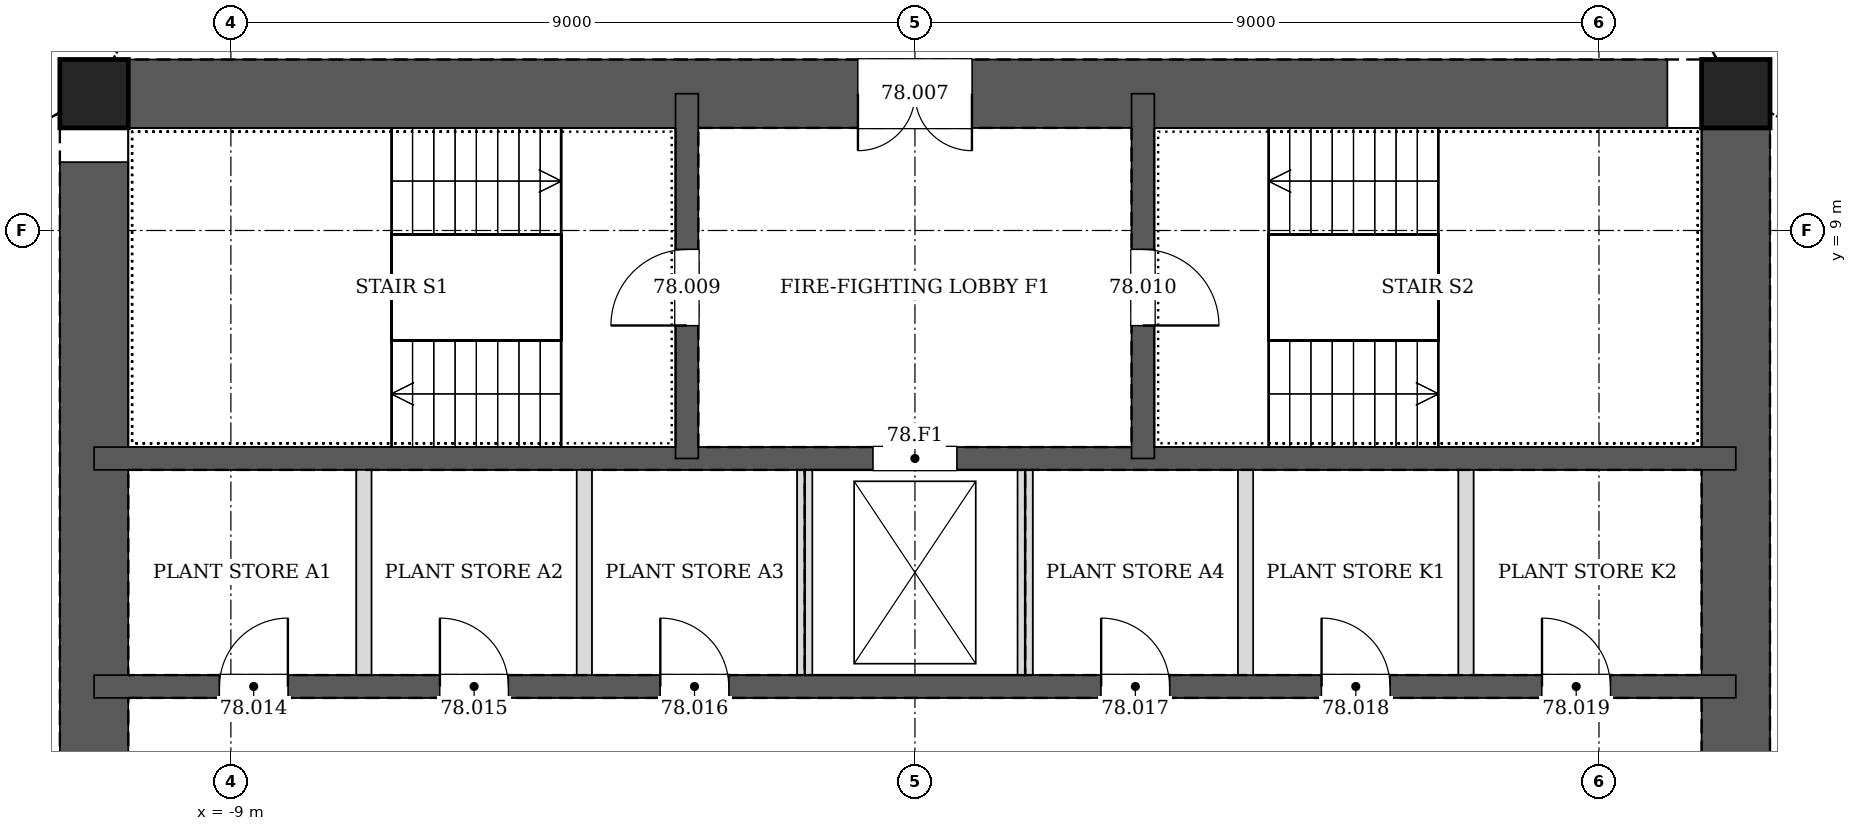
"""IFC4 building model, lengths in metres.
Left out: names, types, materials, properties, quantities, classifications, styles, units other than length and angle.
Written with IfcOpenShell. Run it as: python <this file> out.ifc"""

import sys

from ifc_helpers import new_model, si_unit, direction, frame, frame_2d, origin, origin_2d, place, context, subcontext, project, spatial, rectangle, hollow_rectangle, extrude, element, fill, save


model = new_model("IFC4")
c1 = context("Model", 3, precision=1e-05, world=origin(), true_north=direction((0.0, 1.0)))
c2 = subcontext(c1, "Body", "Model", "MODEL_VIEW")
j1 = project(units=[si_unit("LENGTHUNIT", "METRE"), si_unit("PLANEANGLEUNIT", "RADIAN")], contexts=[c1])
p1 = place(None, origin())
s1 = spatial("IfcSite", under=j1, at=p1, CompositionType="ELEMENT")
p2 = place(p1, origin())
s2 = spatial("IfcBuilding", under=s1, at=p2, CompositionType="ELEMENT")
p3 = place(p2, frame((0.0, 0.0, 317.6)))
s3 = spatial("IfcBuildingStorey", under=s2, at=p3, CompositionType="ELEMENT", Elevation=317.6)
for number, where, z_axis, x_axis in (
    (1, (10.8, 10.8, 0.0), (0.0, 0.0, 1.0), (1.0, 0.0, 0.0)),
    (2, (-10.8, 10.8, 0.0), (0.0, 0.0, 1.0), (1.0, 0.0, 0.0)),
):
    element("IfcColumn", number, at=place(p3, frame(where, z_axis=z_axis, x_axis=x_axis)), inside=s3, PredefinedType="COLUMN", context=c2, shape_type="SweptSolid", body=[
        extrude(hollow_rectangle(XDim=0.9, YDim=0.9, WallThickness=0.04, at=origin_2d()), origin(), (0.0, 0.0, 1.0), 6.0),
    ])
p4 = place(p3, frame((10.8, -10.8, 0.0), z_axis=(0.0, 0.0, 1.0), x_axis=(0.0, 1.0, 0.0)))
e3 = element("IfcWall", 3, at=p4, inside=s3, PredefinedType="SOLIDWALL", context=c2, shape_type="SweptSolid", body=[
    extrude(rectangle(XDim=21.6, YDim=0.9, at=frame_2d((10.8, 0.0))), origin(), (0.0, 0.0, 1.0), 6.0),
])
p5 = place(p4, frame((11.7, 0.0, 0.0)))
e4 = element("IfcOpeningElement", 4, at=p5, cuts=e3, PredefinedType="OPENING", context=c2, shape_type="SweptSolid", body=[
    extrude(rectangle(XDim=1.2, YDim=2.1, at=frame_2d((0.6, 1.05))), frame((0.0, 0.46, 0.0), z_axis=(0.0, -1.0, 0.0), x_axis=(1.0, 0.0, 0.0)), (0.0, 0.0, 1.0), 0.92),
])
p6 = place(p4, frame((8.7, 0.0, 0.0)))
e5 = element("IfcOpeningElement", 5, at=p6, cuts=e3, PredefinedType="OPENING", context=c2, shape_type="SweptSolid", body=[
    extrude(rectangle(XDim=1.2, YDim=2.1, at=frame_2d((0.6, 1.05))), frame((0.0, 0.46, 0.0), z_axis=(0.0, -1.0, 0.0), x_axis=(1.0, 0.0, 0.0)), (0.0, 0.0, 1.0), 0.92),
])
p7 = place(p3, frame((10.8, 10.8, 0.0), z_axis=(0.0, 0.0, 1.0), x_axis=(-1.0, 0.0, 0.0)))
e6 = element("IfcWall", 6, at=p7, inside=s3, PredefinedType="SOLIDWALL", context=c2, shape_type="SweptSolid", body=[
    extrude(rectangle(XDim=21.6, YDim=0.9, at=frame_2d((10.8, 0.0))), origin(), (0.0, 0.0, 1.0), 6.0),
])
p8 = place(p7, frame((10.05, 0.0, 0.0)))
e7 = element("IfcOpeningElement", 7, at=p8, cuts=e6, PredefinedType="OPENING", context=c2, shape_type="SweptSolid", body=[
    extrude(rectangle(XDim=1.5, YDim=2.1, at=frame_2d((0.75, 1.05))), frame((0.0, 0.46, 0.0), z_axis=(0.0, -1.0, 0.0), x_axis=(1.0, 0.0, 0.0)), (0.0, 0.0, 1.0), 0.92),
])
p9 = place(p3, frame((-10.8, 10.8, 0.0), z_axis=(0.0, 0.0, 1.0), x_axis=(0.0, -1.0, 0.0)))
e8 = element("IfcWall", 8, at=p9, inside=s3, PredefinedType="SOLIDWALL", context=c2, shape_type="SweptSolid", body=[
    extrude(rectangle(XDim=21.6, YDim=0.9, at=frame_2d((10.8, 0.0))), origin(), (0.0, 0.0, 1.0), 6.0),
])
p10 = place(p9, frame((8.7, 0.0, 0.0)))
e9 = element("IfcOpeningElement", 9, at=p10, cuts=e8, PredefinedType="OPENING", context=c2, shape_type="SweptSolid", body=[
    extrude(rectangle(XDim=1.2, YDim=2.1, at=frame_2d((0.6, 1.05))), frame((0.0, 0.46, 0.0), z_axis=(0.0, -1.0, 0.0), x_axis=(1.0, 0.0, 0.0)), (0.0, 0.0, 1.0), 0.92),
])
p11 = place(p9, frame((11.7, 0.0, 0.0)))
e10 = element("IfcOpeningElement", 10, at=p11, cuts=e8, PredefinedType="OPENING", context=c2, shape_type="SweptSolid", body=[
    extrude(rectangle(XDim=1.2, YDim=2.1, at=frame_2d((0.6, 1.05))), frame((0.0, 0.46, 0.0), z_axis=(0.0, -1.0, 0.0), x_axis=(1.0, 0.0, 0.0)), (0.0, 0.0, 1.0), 0.92),
])
p12 = place(p3, frame((-10.8, 3.0, 0.0), z_axis=(0.0, 0.0, 1.0), x_axis=(1.0, 0.0, 0.0)))
e11 = element("IfcWall", 11, at=p12, inside=s3, PredefinedType="SOLIDWALL", context=c2, shape_type="SweptSolid", body=[
    extrude(rectangle(XDim=21.6, YDim=0.3, at=frame_2d((10.8, 0.0))), origin(), (0.0, 0.0, 1.0), 6.0),
])
p13 = place(p12, frame((1.65, 0.0, 0.0)))
e12 = element("IfcOpeningElement", 12, at=p13, cuts=e11, PredefinedType="OPENING", context=c2, shape_type="SweptSolid", body=[
    extrude(rectangle(XDim=0.9, YDim=2.1, at=frame_2d((0.45, 1.05))), frame((0.0, 0.16, 0.0), z_axis=(0.0, -1.0, 0.0), x_axis=(1.0, 0.0, 0.0)), (0.0, 0.0, 1.0), 0.32),
])
p14 = place(p12, frame((4.55, 0.0, 0.0)))
e13 = element("IfcOpeningElement", 13, at=p14, cuts=e11, PredefinedType="OPENING", context=c2, shape_type="SweptSolid", body=[
    extrude(rectangle(XDim=0.9, YDim=2.1, at=frame_2d((0.45, 1.05))), frame((0.0, 0.16, 0.0), z_axis=(0.0, -1.0, 0.0), x_axis=(1.0, 0.0, 0.0)), (0.0, 0.0, 1.0), 0.32),
])
p15 = place(p12, frame((7.45, 0.0, 0.0)))
e14 = element("IfcOpeningElement", 14, at=p15, cuts=e11, PredefinedType="OPENING", context=c2, shape_type="SweptSolid", body=[
    extrude(rectangle(XDim=0.9, YDim=2.1, at=frame_2d((0.45, 1.05))), frame((0.0, 0.16, 0.0), z_axis=(0.0, -1.0, 0.0), x_axis=(1.0, 0.0, 0.0)), (0.0, 0.0, 1.0), 0.32),
])
p16 = place(p12, frame((13.25, 0.0, 0.0)))
e15 = element("IfcOpeningElement", 15, at=p16, cuts=e11, PredefinedType="OPENING", context=c2, shape_type="SweptSolid", body=[
    extrude(rectangle(XDim=0.9, YDim=2.1, at=frame_2d((0.45, 1.05))), frame((0.0, 0.16, 0.0), z_axis=(0.0, -1.0, 0.0), x_axis=(1.0, 0.0, 0.0)), (0.0, 0.0, 1.0), 0.32),
])
p17 = place(p12, frame((16.15, 0.0, 0.0)))
e16 = element("IfcOpeningElement", 16, at=p17, cuts=e11, PredefinedType="OPENING", context=c2, shape_type="SweptSolid", body=[
    extrude(rectangle(XDim=0.9, YDim=2.1, at=frame_2d((0.45, 1.05))), frame((0.0, 0.16, 0.0), z_axis=(0.0, -1.0, 0.0), x_axis=(1.0, 0.0, 0.0)), (0.0, 0.0, 1.0), 0.32),
])
p18 = place(p12, frame((19.05, 0.0, 0.0)))
e17 = element("IfcOpeningElement", 17, at=p18, cuts=e11, PredefinedType="OPENING", context=c2, shape_type="SweptSolid", body=[
    extrude(rectangle(XDim=0.9, YDim=2.1, at=frame_2d((0.45, 1.05))), frame((0.0, 0.16, 0.0), z_axis=(0.0, -1.0, 0.0), x_axis=(1.0, 0.0, 0.0)), (0.0, 0.0, 1.0), 0.32),
])
p19 = place(p3, frame((-10.8, 6.0, 0.0), z_axis=(0.0, 0.0, 1.0), x_axis=(1.0, 0.0, 0.0)))
e18 = element("IfcWall", 18, at=p19, inside=s3, PredefinedType="SOLIDWALL", context=c2, shape_type="SweptSolid", body=[
    extrude(rectangle(XDim=21.6, YDim=0.3, at=frame_2d((10.8, 0.0))), origin(), (0.0, 0.0, 1.0), 6.0),
])
p20 = place(p19, frame((10.25, 0.0, 0.0)))
e19 = element("IfcOpeningElement", 19, at=p20, cuts=e18, PredefinedType="OPENING", context=c2, shape_type="SweptSolid", body=[
    extrude(rectangle(XDim=1.1, YDim=2.1, at=frame_2d((0.55, 1.05))), frame((0.0, 0.16, 0.0), z_axis=(0.0, -1.0, 0.0), x_axis=(1.0, 0.0, 0.0)), (0.0, 0.0, 1.0), 0.32),
])
p21 = place(p3, frame((-3.0, 6.0, 0.0), z_axis=(0.0, 0.0, 1.0), x_axis=(0.0, 1.0, 0.0)))
e20 = element("IfcWall", 20, at=p21, inside=s3, PredefinedType="SOLIDWALL", context=c2, shape_type="SweptSolid", body=[
    extrude(rectangle(XDim=4.8, YDim=0.3, at=frame_2d((2.4, 0.0))), origin(), (0.0, 0.0, 1.0), 6.0),
])
p22 = place(p21, frame((1.75, 0.0, 0.0)))
e21 = element("IfcOpeningElement", 21, at=p22, cuts=e20, PredefinedType="OPENING", context=c2, shape_type="SweptSolid", body=[
    extrude(rectangle(XDim=1.0, YDim=2.1, at=frame_2d((0.5, 1.05))), frame((0.0, 0.16, 0.0), z_axis=(0.0, -1.0, 0.0), x_axis=(1.0, 0.0, 0.0)), (0.0, 0.0, 1.0), 0.32),
])
p23 = place(p3, frame((3.0, 6.0, 0.0), z_axis=(0.0, 0.0, 1.0), x_axis=(0.0, 1.0, 0.0)))
e22 = element("IfcWall", 22, at=p23, inside=s3, PredefinedType="SOLIDWALL", context=c2, shape_type="SweptSolid", body=[
    extrude(rectangle(XDim=4.8, YDim=0.3, at=frame_2d((2.4, 0.0))), origin(), (0.0, 0.0, 1.0), 6.0),
])
p24 = place(p23, frame((1.75, 0.0, 0.0)))
e23 = element("IfcOpeningElement", 23, at=p24, cuts=e22, PredefinedType="OPENING", context=c2, shape_type="SweptSolid", body=[
    extrude(rectangle(XDim=1.0, YDim=2.1, at=frame_2d((0.5, 1.05))), frame((0.0, 0.16, 0.0), z_axis=(0.0, -1.0, 0.0), x_axis=(1.0, 0.0, 0.0)), (0.0, 0.0, 1.0), 0.32),
])
for number, where, z_axis, x_axis in (
    (24, (-7.25, 3.15, 0.0), (0.0, 0.0, 1.0), (0.0, 1.0, 0.0)),
    (25, (-4.35, 3.15, 0.0), (0.0, 0.0, 1.0), (0.0, 1.0, 0.0)),
    (26, (-1.45, 3.15, 0.0), (0.0, 0.0, 1.0), (0.0, 1.0, 0.0)),
    (27, (1.45, 3.15, 0.0), (0.0, 0.0, 1.0), (0.0, 1.0, 0.0)),
    (28, (4.35, 3.15, 0.0), (0.0, 0.0, 1.0), (0.0, 1.0, 0.0)),
    (29, (7.25, 3.15, 0.0), (0.0, 0.0, 1.0), (0.0, 1.0, 0.0)),
):
    element("IfcWall", number, at=place(p3, frame(where, z_axis=z_axis, x_axis=x_axis)), inside=s3, PredefinedType="PARTITIONING", context=c2, shape_type="SweptSolid", body=[
        extrude(rectangle(XDim=2.7, YDim=0.2, at=frame_2d((1.35, 0.0))), origin(), (0.0, 0.0, 1.0), 5.75),
    ])
p25 = place(p8, origin())
e30 = element("IfcDoor", 30, at=p25, inside=s3, OperationType="DOUBLE_DOOR_SINGLE_SWING", PredefinedType="DOOR", context=c2, shape_type="SweptSolid", body=[
    extrude(rectangle(XDim=1.5, YDim=2.1, at=frame_2d((0.75, 1.05))), frame((0.0, 0.025, 0.0), z_axis=(0.0, -1.0, 0.0), x_axis=(1.0, 0.0, 0.0)), (0.0, 0.0, 1.0), 0.05),
])
fill(e7, e30)
p26 = place(p22, origin())
e31 = element("IfcDoor", 31, at=p26, inside=s3, OperationType="SINGLE_SWING_LEFT", PredefinedType="DOOR", context=c2, shape_type="SweptSolid", body=[
    extrude(rectangle(XDim=1.0, YDim=2.1, at=frame_2d((0.5, 1.05))), frame((0.0, 0.025, 0.0), z_axis=(0.0, -1.0, 0.0), x_axis=(1.0, 0.0, 0.0)), (0.0, 0.0, 1.0), 0.05),
])
fill(e21, e31)
p27 = place(p24, frame((1.0, 0.0, 0.0), z_axis=(0.0, 0.0, 1.0), x_axis=(-1.0, 0.0, 0.0)))
e32 = element("IfcDoor", 32, at=p27, inside=s3, OperationType="SINGLE_SWING_RIGHT", PredefinedType="DOOR", context=c2, shape_type="SweptSolid", body=[
    extrude(rectangle(XDim=1.0, YDim=2.1, at=frame_2d((0.5, 1.05))), frame((0.0, 0.025, 0.0), z_axis=(0.0, -1.0, 0.0), x_axis=(1.0, 0.0, 0.0)), (0.0, 0.0, 1.0), 0.05),
])
fill(e23, e32)
p28 = place(p13, origin())
e33 = element("IfcDoor", 33, at=p28, inside=s3, OperationType="SINGLE_SWING_RIGHT", PredefinedType="DOOR", context=c2, shape_type="SweptSolid", body=[
    extrude(rectangle(XDim=0.9, YDim=2.1, at=frame_2d((0.45, 1.05))), frame((0.0, 0.025, 0.0), z_axis=(0.0, -1.0, 0.0), x_axis=(1.0, 0.0, 0.0)), (0.0, 0.0, 1.0), 0.05),
])
fill(e12, e33)
p29 = place(p14, origin())
e34 = element("IfcDoor", 34, at=p29, inside=s3, OperationType="SINGLE_SWING_LEFT", PredefinedType="DOOR", context=c2, shape_type="SweptSolid", body=[
    extrude(rectangle(XDim=0.9, YDim=2.1, at=frame_2d((0.45, 1.05))), frame((0.0, 0.025, 0.0), z_axis=(0.0, -1.0, 0.0), x_axis=(1.0, 0.0, 0.0)), (0.0, 0.0, 1.0), 0.05),
])
fill(e13, e34)
p30 = place(p15, origin())
e35 = element("IfcDoor", 35, at=p30, inside=s3, OperationType="SINGLE_SWING_LEFT", PredefinedType="DOOR", context=c2, shape_type="SweptSolid", body=[
    extrude(rectangle(XDim=0.9, YDim=2.1, at=frame_2d((0.45, 1.05))), frame((0.0, 0.025, 0.0), z_axis=(0.0, -1.0, 0.0), x_axis=(1.0, 0.0, 0.0)), (0.0, 0.0, 1.0), 0.05),
])
fill(e14, e35)
p31 = place(p16, origin())
e36 = element("IfcDoor", 36, at=p31, inside=s3, OperationType="SINGLE_SWING_LEFT", PredefinedType="DOOR", context=c2, shape_type="SweptSolid", body=[
    extrude(rectangle(XDim=0.9, YDim=2.1, at=frame_2d((0.45, 1.05))), frame((0.0, 0.025, 0.0), z_axis=(0.0, -1.0, 0.0), x_axis=(1.0, 0.0, 0.0)), (0.0, 0.0, 1.0), 0.05),
])
fill(e15, e36)
p32 = place(p17, origin())
e37 = element("IfcDoor", 37, at=p32, inside=s3, OperationType="SINGLE_SWING_LEFT", PredefinedType="DOOR", context=c2, shape_type="SweptSolid", body=[
    extrude(rectangle(XDim=0.9, YDim=2.1, at=frame_2d((0.45, 1.05))), frame((0.0, 0.025, 0.0), z_axis=(0.0, -1.0, 0.0), x_axis=(1.0, 0.0, 0.0)), (0.0, 0.0, 1.0), 0.05),
])
fill(e16, e37)
p33 = place(p18, origin())
e38 = element("IfcDoor", 38, at=p33, inside=s3, OperationType="SINGLE_SWING_LEFT", PredefinedType="DOOR", context=c2, shape_type="SweptSolid", body=[
    extrude(rectangle(XDim=0.9, YDim=2.1, at=frame_2d((0.45, 1.05))), frame((0.0, 0.025, 0.0), z_axis=(0.0, -1.0, 0.0), x_axis=(1.0, 0.0, 0.0)), (0.0, 0.0, 1.0), 0.05),
])
fill(e17, e38)
p34 = place(p20, origin())
e39 = element("IfcDoor", 39, at=p34, inside=s3, OperationType="DOUBLE_DOOR_SLIDING", PredefinedType="DOOR", context=c2, shape_type="SweptSolid", body=[
    extrude(rectangle(XDim=1.1, YDim=2.1, at=frame_2d((0.55, 1.05))), frame((0.0, 0.025, 0.0), z_axis=(0.0, -1.0, 0.0), x_axis=(1.0, 0.0, 0.0)), (0.0, 0.0, 1.0), 0.05),
])
fill(e19, e39)
save(model, sys.argv[1])
